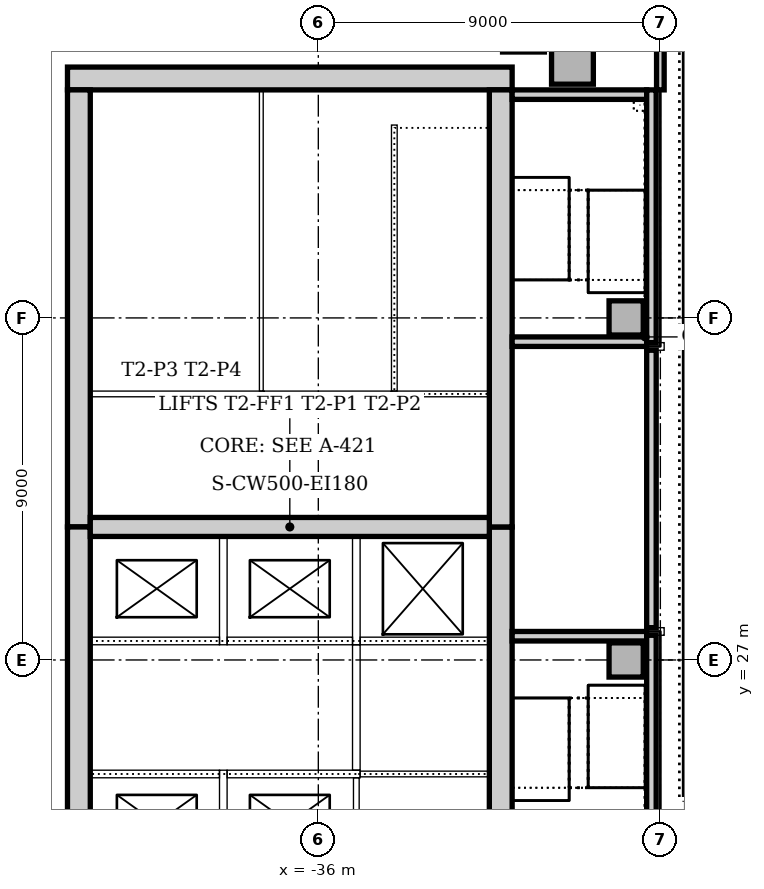
"""IFC4 building model, lengths in metres.
Left out: names, types, materials, properties, quantities, classifications, styles, units other than length and angle.
Written with IfcOpenShell. Run it as: python <this file> out.ifc"""

import sys

from ifc_helpers import new_model, si_unit, direction, frame, frame_2d, origin, origin_2d, place, context, subcontext, project, spatial, rectangle, extrude, element, fill, save


model = new_model("IFC4")
c1 = context("Model", 3, precision=1e-05, world=origin(), true_north=direction((0.0, 1.0)))
c2 = subcontext(c1, "Body", "Model", "MODEL_VIEW")
j1 = project(units=[si_unit("LENGTHUNIT", "METRE"), si_unit("PLANEANGLEUNIT", "RADIAN")], contexts=[c1])
p1 = place(None, origin())
s1 = spatial("IfcSite", under=j1, at=p1, CompositionType="ELEMENT")
p2 = place(p1, origin())
s2 = spatial("IfcBuilding", under=s1, at=p2, CompositionType="ELEMENT")
p3 = place(p2, frame((0.0, 0.0, 21.0)))
s3 = spatial("IfcBuildingStorey", under=s2, at=p3, CompositionType="ELEMENT", Elevation=21.0)
p4 = place(p3, frame((-30.9, 42.3, 0.0), z_axis=(0.0, 0.0, 1.0), x_axis=(-1.0, 0.0, 0.0)))
e1 = element("IfcWall", 1, at=p4, inside=s3, PredefinedType="SOLIDWALL", context=c2, shape_type="SweptSolid", body=[
    extrude(rectangle(XDim=11.7, YDim=0.6, at=frame_2d((5.85, 0.0))), origin(), (0.0, 0.0, 1.0), 5.0),
])
p5 = place(p3, frame((-31.2, 21.0, 0.0), z_axis=(0.0, 0.0, 1.0), x_axis=(0.0, 1.0, 0.0)))
e2 = element("IfcWall", 2, at=p5, inside=s3, PredefinedType="SOLIDWALL", context=c2, shape_type="SweptSolid", body=[
    extrude(rectangle(XDim=9.5, YDim=0.6, at=frame_2d((4.75, 0.0))), origin(), (0.0, 0.0, 1.0), 5.0),
])
p6 = place(p5, frame((5.25, 0.0, 0.0)))
e3 = element("IfcOpeningElement", 3, at=p6, cuts=e2, PredefinedType="OPENING", context=c2, shape_type="SweptSolid", body=[
    extrude(rectangle(XDim=1.0, YDim=2.1, at=frame_2d((0.5, 1.05))), frame((0.0, 0.31, 0.0), z_axis=(0.0, -1.0, 0.0), x_axis=(1.0, 0.0, 0.0)), (0.0, 0.0, 1.0), 0.62),
])
p7 = place(p3, frame((-31.2, 30.5, 0.0), z_axis=(0.0, 0.0, 1.0), x_axis=(0.0, 1.0, 0.0)))
e4 = element("IfcWall", 4, at=p7, inside=s3, PredefinedType="SOLIDWALL", context=c2, shape_type="SweptSolid", body=[
    extrude(rectangle(XDim=11.5, YDim=0.6, at=frame_2d((5.75, 0.0))), origin(), (0.0, 0.0, 1.0), 5.0),
])
p8 = place(p7, frame((0.85, 0.0, 0.0)))
e5 = element("IfcOpeningElement", 5, at=p8, cuts=e4, PredefinedType="OPENING", context=c2, shape_type="SweptSolid", body=[
    extrude(rectangle(XDim=1.8, YDim=2.1, at=frame_2d((0.9, 1.05))), frame((0.0, 0.31, 0.0), z_axis=(0.0, -1.0, 0.0), x_axis=(1.0, 0.0, 0.0)), (0.0, 0.0, 1.0), 0.62),
])
p9 = place(p3, frame((-42.3, 42.0, 0.0), z_axis=(0.0, 0.0, 1.0), x_axis=(0.0, -1.0, 0.0)))
e6 = element("IfcWall", 6, at=p9, inside=s3, PredefinedType="SOLIDWALL", context=c2, shape_type="SweptSolid", body=[
    extrude(rectangle(XDim=11.5, YDim=0.6, at=frame_2d((5.75, 0.0))), origin(), (0.0, 0.0, 1.0), 5.0),
])
p10 = place(p9, frame((8.85, 0.0, 0.0)))
e7 = element("IfcOpeningElement", 7, at=p10, cuts=e6, PredefinedType="OPENING", context=c2, shape_type="SweptSolid", body=[
    extrude(rectangle(XDim=1.8, YDim=2.1, at=frame_2d((0.9, 1.05))), frame((0.0, 0.31, 0.0), z_axis=(0.0, -1.0, 0.0), x_axis=(1.0, 0.0, 0.0)), (0.0, 0.0, 1.0), 0.62),
])
p11 = place(p3, frame((-42.3, 30.5, 0.0), z_axis=(0.0, 0.0, 1.0), x_axis=(0.0, -1.0, 0.0)))
e8 = element("IfcWall", 8, at=p11, inside=s3, PredefinedType="SOLIDWALL", context=c2, shape_type="SweptSolid", body=[
    extrude(rectangle(XDim=9.5, YDim=0.6, at=frame_2d((4.75, 0.0))), origin(), (0.0, 0.0, 1.0), 5.0),
])
p12 = place(p11, frame((3.85, 0.0, 0.0)))
e9 = element("IfcOpeningElement", 9, at=p12, cuts=e8, PredefinedType="OPENING", context=c2, shape_type="SweptSolid", body=[
    extrude(rectangle(XDim=1.8, YDim=2.1, at=frame_2d((0.9, 1.05))), frame((0.0, 0.31, 0.0), z_axis=(0.0, -1.0, 0.0), x_axis=(1.0, 0.0, 0.0)), (0.0, 0.0, 1.0), 0.62),
])
p13 = place(p3, frame((-42.0, 30.5, 0.0), z_axis=(0.0, 0.0, 1.0), x_axis=(1.0, 0.0, 0.0)))
e10 = element("IfcWall", 10, at=p13, inside=s3, PredefinedType="SOLIDWALL", context=c2, shape_type="SweptSolid", body=[
    extrude(rectangle(XDim=10.5, YDim=0.5, at=frame_2d((5.25, 0.0))), origin(), (0.0, 0.0, 1.0), 5.0),
])
p14 = place(p3, frame((-27.36, 27.625, 0.0), z_axis=(0.0, 0.0, 1.0), x_axis=(-1.0, 0.0, 0.0)))
e11 = element("IfcWall", 11, at=p14, inside=s3, PredefinedType="SOLIDWALL", context=c2, shape_type="SweptSolid", body=[
    extrude(rectangle(XDim=3.54, YDim=0.25, at=frame_2d((1.77, 0.0))), origin(), (0.0, 0.0, 1.0), 5.0),
])
p15 = place(p14, frame((1.69, 0.0, 0.0)))
e12 = element("IfcOpeningElement", 12, at=p15, cuts=e11, PredefinedType="OPENING", context=c2, shape_type="SweptSolid", body=[
    extrude(rectangle(XDim=1.1, YDim=2.1, at=frame_2d((0.55, 1.05))), frame((0.0, 0.135, 0.0), z_axis=(0.0, -1.0, 0.0), x_axis=(1.0, 0.0, 0.0)), (0.0, 0.0, 1.0), 0.27),
])
p16 = place(p3, frame((-30.9, 35.375, 0.0), z_axis=(0.0, 0.0, 1.0), x_axis=(1.0, 0.0, 0.0)))
e13 = element("IfcWall", 13, at=p16, inside=s3, PredefinedType="SOLIDWALL", context=c2, shape_type="SweptSolid", body=[
    extrude(rectangle(XDim=3.54, YDim=0.25, at=frame_2d((1.77, 0.0))), origin(), (0.0, 0.0, 1.0), 5.0),
])
p17 = place(p16, frame((0.75, 0.0, 0.0)))
e14 = element("IfcOpeningElement", 14, at=p17, cuts=e13, PredefinedType="OPENING", context=c2, shape_type="SweptSolid", body=[
    extrude(rectangle(XDim=1.1, YDim=2.1, at=frame_2d((0.55, 1.05))), frame((0.0, 0.135, 0.0), z_axis=(0.0, -1.0, 0.0), x_axis=(1.0, 0.0, 0.0)), (0.0, 0.0, 1.0), 0.27),
])
p18 = place(p3, frame((-27.36, 41.875, 0.0), z_axis=(0.0, 0.0, 1.0), x_axis=(-1.0, 0.0, 0.0)))
e15 = element("IfcWall", 15, at=p18, inside=s3, PredefinedType="SOLIDWALL", context=c2, shape_type="SweptSolid", body=[
    extrude(rectangle(XDim=3.54, YDim=0.25, at=frame_2d((1.77, 0.0))), origin(), (0.0, 0.0, 1.0), 5.0),
])
p19 = place(p3, frame((-27.235, 21.0, 0.0), z_axis=(0.0, 0.0, 1.0), x_axis=(0.0, 1.0, 0.0)))
e16 = element("IfcWall", 16, at=p19, inside=s3, PredefinedType="SOLIDWALL", context=c2, shape_type="SweptSolid", body=[
    extrude(rectangle(XDim=6.65, YDim=0.25, at=frame_2d((3.325, 0.0))), origin(), (0.0, 0.0, 1.0), 5.0),
])
p20 = place(p3, frame((-27.235, 27.85, 0.0), z_axis=(0.0, 0.0, 1.0), x_axis=(0.0, 1.0, 0.0)))
e17 = element("IfcWall", 17, at=p20, inside=s3, PredefinedType="SOLIDWALL", context=c2, shape_type="SweptSolid", body=[
    extrude(rectangle(XDim=7.3, YDim=0.25, at=frame_2d((3.65, 0.0))), origin(), (0.0, 0.0, 1.0), 5.0),
])
p21 = place(p3, frame((-27.235, 35.35, 0.0), z_axis=(0.0, 0.0, 1.0), x_axis=(0.0, 1.0, 0.0)))
e18 = element("IfcWall", 18, at=p21, inside=s3, PredefinedType="SOLIDWALL", context=c2, shape_type="SweptSolid", body=[
    extrude(rectangle(XDim=6.65, YDim=0.25, at=frame_2d((3.325, 0.0))), origin(), (0.0, 0.0, 1.0), 5.0),
])
for number, where, z_axis, x_axis in (
    (19, (-29.313, 42.7, 0.0), (0.0, 0.0, 1.0), (1.0, 0.0, 0.0)),
    (20, (-30.602, 43.547, 0.0), (0.0, 0.0, 1.0), (1.0, 0.0, 0.0)),
):
    element("IfcColumn", number, at=place(p3, frame(where, z_axis=z_axis, x_axis=x_axis)), inside=s3, PredefinedType="COLUMN", context=c2, shape_type="SweptSolid", body=[
        extrude(rectangle(XDim=1.1, YDim=1.1, at=origin_2d()), origin(), (0.0, 0.0, 1.0), 4.85),
    ])
for number, where, z_axis, x_axis in (
    (21, (-27.9, 27.0, 0.0), (0.0, 0.0, 1.0), (1.0, 0.0, 0.0)),
    (22, (-27.9, 36.0, 0.0), (0.0, 0.0, 1.0), (1.0, 0.0, 0.0)),
):
    element("IfcColumn", number, at=place(p3, frame(where, z_axis=z_axis, x_axis=x_axis)), inside=s3, PredefinedType="COLUMN", context=c2, shape_type="SweptSolid", body=[
        extrude(rectangle(XDim=0.9, YDim=0.9, at=origin_2d()), origin(), (0.0, 0.0, 1.0), 5.0),
    ])
p22 = place(p3, frame((-27.0, 42.0, 0.0), z_axis=(0.0, 0.0, 1.0), x_axis=(0.0, 1.0, 0.0)))
e23 = element("IfcWall", 23, at=p22, inside=s3, PredefinedType="PARTITIONING", context=c2, shape_type="SweptSolid", body=[
    extrude(rectangle(XDim=3.0, YDim=0.2, at=frame_2d((1.5, 0.0))), origin(), (0.0, 0.0, 1.0), 4.7),
])
p23 = place(p3, frame((-38.5, 21.0, 0.0), z_axis=(0.0, 0.0, 1.0), x_axis=(0.0, 1.0, 0.0)))
e24 = element("IfcWall", 24, at=p23, inside=s3, PredefinedType="SOLIDWALL", context=c2, shape_type="SweptSolid", body=[
    extrude(rectangle(XDim=3.1, YDim=0.2, at=frame_2d((1.55, 0.0))), origin(), (0.0, 0.0, 1.0), 5.0),
])
p24 = place(p3, frame((-38.6, 24.0, 0.0), z_axis=(0.0, 0.0, 1.0), x_axis=(-1.0, 0.0, 0.0)))
e25 = element("IfcWall", 25, at=p24, inside=s3, PredefinedType="SOLIDWALL", context=c2, shape_type="SweptSolid", body=[
    extrude(rectangle(XDim=3.4, YDim=0.2, at=frame_2d((1.7, 0.0))), origin(), (0.0, 0.0, 1.0), 5.0),
])
p25 = place(p24, frame((0.8, 0.0, 0.0)))
e26 = element("IfcOpeningElement", 26, at=p25, cuts=e25, PredefinedType="OPENING", context=c2, shape_type="SweptSolid", body=[
    extrude(rectangle(XDim=1.1, YDim=2.1, at=frame_2d((0.55, 1.05))), frame((0.0, 0.11, 0.0), z_axis=(0.0, -1.0, 0.0), x_axis=(1.0, 0.0, 0.0)), (0.0, 0.0, 1.0), 0.22),
])
p26 = place(p3, frame((-34.9, 24.0, 0.0), z_axis=(0.0, 0.0, 1.0), x_axis=(-1.0, 0.0, 0.0)))
e27 = element("IfcWall", 27, at=p26, inside=s3, PredefinedType="SOLIDWALL", context=c2, shape_type="SweptSolid", body=[
    extrude(rectangle(XDim=3.5, YDim=0.2, at=frame_2d((1.75, 0.0))), origin(), (0.0, 0.0, 1.0), 5.0),
])
p27 = place(p26, frame((1.3, 0.0, 0.0)))
e28 = element("IfcOpeningElement", 28, at=p27, cuts=e27, PredefinedType="OPENING", context=c2, shape_type="SweptSolid", body=[
    extrude(rectangle(XDim=1.1, YDim=2.1, at=frame_2d((0.55, 1.05))), frame((0.0, 0.11, 0.0), z_axis=(0.0, -1.0, 0.0), x_axis=(1.0, 0.0, 0.0)), (0.0, 0.0, 1.0), 0.22),
])
p28 = place(p3, frame((-38.5, 27.4, 0.0), z_axis=(0.0, 0.0, 1.0), x_axis=(0.0, 1.0, 0.0)))
e29 = element("IfcWall", 29, at=p28, inside=s3, PredefinedType="SOLIDWALL", context=c2, shape_type="SweptSolid", body=[
    extrude(rectangle(XDim=2.85, YDim=0.2, at=frame_2d((1.425, 0.0))), origin(), (0.0, 0.0, 1.0), 5.0),
])
p29 = place(p3, frame((-42.0, 27.5, 0.0), z_axis=(0.0, 0.0, 1.0), x_axis=(1.0, 0.0, 0.0)))
e30 = element("IfcWall", 30, at=p29, inside=s3, PredefinedType="SOLIDWALL", context=c2, shape_type="SweptSolid", body=[
    extrude(rectangle(XDim=3.4, YDim=0.2, at=frame_2d((1.7, 0.0))), origin(), (0.0, 0.0, 1.0), 5.0),
])
p30 = place(p29, frame((1.5, 0.0, 0.0)))
e31 = element("IfcOpeningElement", 31, at=p30, cuts=e30, PredefinedType="OPENING", context=c2, shape_type="SweptSolid", body=[
    extrude(rectangle(XDim=1.1, YDim=2.1, at=frame_2d((0.55, 1.05))), frame((0.0, 0.11, 0.0), z_axis=(0.0, -1.0, 0.0), x_axis=(1.0, 0.0, 0.0)), (0.0, 0.0, 1.0), 0.22),
])
p31 = place(p3, frame((-35.0, 27.4, 0.0), z_axis=(0.0, 0.0, 1.0), x_axis=(0.0, 1.0, 0.0)))
e32 = element("IfcWall", 32, at=p31, inside=s3, PredefinedType="SOLIDWALL", context=c2, shape_type="SweptSolid", body=[
    extrude(rectangle(XDim=2.85, YDim=0.2, at=frame_2d((1.425, 0.0))), origin(), (0.0, 0.0, 1.0), 5.0),
])
p32 = place(p3, frame((-38.4, 27.5, 0.0), z_axis=(0.0, 0.0, 1.0), x_axis=(1.0, 0.0, 0.0)))
e33 = element("IfcWall", 33, at=p32, inside=s3, PredefinedType="SOLIDWALL", context=c2, shape_type="SweptSolid", body=[
    extrude(rectangle(XDim=3.3, YDim=0.2, at=frame_2d((1.65, 0.0))), origin(), (0.0, 0.0, 1.0), 5.0),
])
p33 = place(p32, frame((1.1, 0.0, 0.0)))
e34 = element("IfcOpeningElement", 34, at=p33, cuts=e33, PredefinedType="OPENING", context=c2, shape_type="SweptSolid", body=[
    extrude(rectangle(XDim=1.1, YDim=2.1, at=frame_2d((0.55, 1.05))), frame((0.0, 0.11, 0.0), z_axis=(0.0, -1.0, 0.0), x_axis=(1.0, 0.0, 0.0)), (0.0, 0.0, 1.0), 0.22),
])
p34 = place(p3, frame((-34.9, 27.5, 0.0), z_axis=(0.0, 0.0, 1.0), x_axis=(1.0, 0.0, 0.0)))
e35 = element("IfcWall", 35, at=p34, inside=s3, PredefinedType="SOLIDWALL", context=c2, shape_type="SweptSolid", body=[
    extrude(rectangle(XDim=3.4, YDim=0.2, at=frame_2d((1.7, 0.0))), origin(), (0.0, 0.0, 1.0), 5.0),
])
p35 = place(p34, frame((1.1, 0.0, 0.0)))
e36 = element("IfcOpeningElement", 36, at=p35, cuts=e35, PredefinedType="OPENING", context=c2, shape_type="SweptSolid", body=[
    extrude(rectangle(XDim=1.1, YDim=2.1, at=frame_2d((0.55, 1.05))), frame((0.0, 0.11, 0.0), z_axis=(0.0, -1.0, 0.0), x_axis=(1.0, 0.0, 0.0)), (0.0, 0.0, 1.0), 0.22),
])
p36 = place(p3, frame((-35.0, 24.1, 0.0), z_axis=(0.0, 0.0, 1.0), x_axis=(0.0, 1.0, 0.0)))
e37 = element("IfcWall", 37, at=p36, inside=s3, PredefinedType="SOLIDWALL", context=c2, shape_type="SweptSolid", body=[
    extrude(rectangle(XDim=3.3, YDim=0.2, at=frame_2d((1.65, 0.0))), origin(), (0.0, 0.0, 1.0), 5.0),
])
p37 = place(p36, frame((1.15, 0.0, 0.0)))
e38 = element("IfcOpeningElement", 38, at=p37, cuts=e37, PredefinedType="OPENING", context=c2, shape_type="SweptSolid", body=[
    extrude(rectangle(XDim=1.0, YDim=2.1, at=frame_2d((0.5, 1.05))), frame((0.0, 0.11, 0.0), z_axis=(0.0, -1.0, 0.0), x_axis=(1.0, 0.0, 0.0)), (0.0, 0.0, 1.0), 0.22),
])
for number, where, z_axis, x_axis in (
    (39, (-27.36, 27.75, 0.0), (0.0, 0.0, 1.0), (1.0, 0.0, 0.0)),
    (40, (-26.9, 35.25, 0.0), (0.0, 0.0, 1.0), (-1.0, 0.0, 0.0)),
):
    element("IfcWall", number, at=place(p3, frame(where, z_axis=z_axis, x_axis=x_axis)), inside=s3, PredefinedType="SOLIDWALL", context=c2, shape_type="SweptSolid", body=[
        extrude(rectangle(XDim=0.46, YDim=0.2, at=frame_2d((0.23, 0.0))), origin(), (0.0, 0.0, 1.0), 5.0),
    ])
p38 = place(p3, frame((-35.0, 21.0, 0.0), z_axis=(0.0, 0.0, 1.0), x_axis=(0.0, 1.0, 0.0)))
e41 = element("IfcWall", 41, at=p38, inside=s3, PredefinedType="SOLIDWALL", context=c2, shape_type="SweptSolid", body=[
    extrude(rectangle(XDim=2.9, YDim=0.15, at=frame_2d((1.45, 0.0))), origin(), (0.0, 0.0, 1.0), 5.0),
])
p39 = place(p3, frame((-31.5, 24.0, 0.0), z_axis=(0.0, 0.0, 1.0), x_axis=(-1.0, 0.0, 0.0)))
e42 = element("IfcWall", 42, at=p39, inside=s3, PredefinedType="SOLIDWALL", context=c2, shape_type="SweptSolid", body=[
    extrude(rectangle(XDim=3.4, YDim=0.15, at=frame_2d((1.7, 0.0))), origin(), (0.0, 0.0, 1.0), 5.0),
])
p40 = place(p3, frame((-34.075, 34.0, 0.0), z_axis=(0.0, 0.0, 1.0), x_axis=(1.0, 0.0, 0.0)))
e43 = element("IfcWall", 43, at=p40, inside=s3, PredefinedType="SOLIDWALL", context=c2, shape_type="SweptSolid", body=[
    extrude(rectangle(XDim=2.575, YDim=0.15, at=frame_2d((1.288, 0.0))), origin(), (0.0, 0.0, 1.0), 5.0),
])
p41 = place(p3, frame((-34.0, 41.075, 0.0), z_axis=(0.0, 0.0, 1.0), x_axis=(0.0, -1.0, 0.0)))
e44 = element("IfcWall", 44, at=p41, inside=s3, PredefinedType="SOLIDWALL", context=c2, shape_type="SweptSolid", body=[
    extrude(rectangle(XDim=7.0, YDim=0.15, at=frame_2d((3.5, 0.0))), origin(), (0.0, 0.0, 1.0), 5.0),
])
p42 = place(p3, frame((-37.425, 34.0, 0.0), z_axis=(0.0, 0.0, 1.0), x_axis=(-1.0, 0.0, 0.0)))
e45 = element("IfcWall", 45, at=p42, inside=s3, PredefinedType="PARTITIONING", context=c2, shape_type="SweptSolid", body=[
    extrude(rectangle(XDim=4.575, YDim=0.15, at=frame_2d((2.288, 0.0))), origin(), (0.0, 0.0, 1.0), 4.85),
])
p43 = place(p42, frame((1.925, 0.0, 0.0)))
e46 = element("IfcOpeningElement", 46, at=p43, cuts=e45, PredefinedType="OPENING", context=c2, shape_type="SweptSolid", body=[
    extrude(rectangle(XDim=0.8, YDim=2.1, at=frame_2d((0.4, 1.05))), frame((0.0, 0.085, 0.0), z_axis=(0.0, -1.0, 0.0), x_axis=(1.0, 0.0, 0.0)), (0.0, 0.0, 1.0), 0.17),
])
p44 = place(p3, frame((-34.075, 34.0, 0.0), z_axis=(0.0, 0.0, 1.0), x_axis=(-1.0, 0.0, 0.0)))
e47 = element("IfcWall", 47, at=p44, inside=s3, PredefinedType="PARTITIONING", context=c2, shape_type="SweptSolid", body=[
    extrude(rectangle(XDim=3.35, YDim=0.15, at=frame_2d((1.675, 0.0))), origin(), (0.0, 0.0, 1.0), 4.85),
])
p45 = place(p44, frame((1.275, 0.0, 0.0)))
e48 = element("IfcOpeningElement", 48, at=p45, cuts=e47, PredefinedType="OPENING", context=c2, shape_type="SweptSolid", body=[
    extrude(rectangle(XDim=0.8, YDim=2.1, at=frame_2d((0.4, 1.05))), frame((0.0, 0.085, 0.0), z_axis=(0.0, -1.0, 0.0), x_axis=(1.0, 0.0, 0.0)), (0.0, 0.0, 1.0), 0.17),
])
p46 = place(p3, frame((-37.5, 34.075, 0.0), z_axis=(0.0, 0.0, 1.0), x_axis=(0.0, 1.0, 0.0)))
e49 = element("IfcWall", 49, at=p46, inside=s3, PredefinedType="PARTITIONING", context=c2, shape_type="SweptSolid", body=[
    extrude(rectangle(XDim=7.925, YDim=0.1, at=frame_2d((3.962, 0.0))), origin(), (0.0, 0.0, 1.0), 4.85),
])
p47 = place(p25, origin())
e50 = element("IfcDoor", 50, at=p47, inside=s3, OperationType="SLIDING_TO_LEFT", PredefinedType="DOOR", context=c2, shape_type="SweptSolid", body=[
    extrude(rectangle(XDim=1.1, YDim=2.1, at=frame_2d((0.55, 1.05))), frame((0.0, 0.025, 0.0), z_axis=(0.0, -1.0, 0.0), x_axis=(1.0, 0.0, 0.0)), (0.0, 0.0, 1.0), 0.05),
])
fill(e26, e50)
p48 = place(p27, origin())
e51 = element("IfcDoor", 51, at=p48, inside=s3, OperationType="SLIDING_TO_LEFT", PredefinedType="DOOR", context=c2, shape_type="SweptSolid", body=[
    extrude(rectangle(XDim=1.1, YDim=2.1, at=frame_2d((0.55, 1.05))), frame((0.0, 0.025, 0.0), z_axis=(0.0, -1.0, 0.0), x_axis=(1.0, 0.0, 0.0)), (0.0, 0.0, 1.0), 0.05),
])
fill(e28, e51)
p49 = place(p30, origin())
e52 = element("IfcDoor", 52, at=p49, inside=s3, OperationType="SLIDING_TO_LEFT", PredefinedType="DOOR", context=c2, shape_type="SweptSolid", body=[
    extrude(rectangle(XDim=1.1, YDim=2.1, at=frame_2d((0.55, 1.05))), frame((0.0, 0.025, 0.0), z_axis=(0.0, -1.0, 0.0), x_axis=(1.0, 0.0, 0.0)), (0.0, 0.0, 1.0), 0.05),
])
fill(e31, e52)
p50 = place(p33, origin())
e53 = element("IfcDoor", 53, at=p50, inside=s3, OperationType="SLIDING_TO_LEFT", PredefinedType="DOOR", context=c2, shape_type="SweptSolid", body=[
    extrude(rectangle(XDim=1.1, YDim=2.1, at=frame_2d((0.55, 1.05))), frame((0.0, 0.025, 0.0), z_axis=(0.0, -1.0, 0.0), x_axis=(1.0, 0.0, 0.0)), (0.0, 0.0, 1.0), 0.05),
])
fill(e34, e53)
p51 = place(p35, origin())
e54 = element("IfcDoor", 54, at=p51, inside=s3, OperationType="SLIDING_TO_LEFT", PredefinedType="DOOR", context=c2, shape_type="SweptSolid", body=[
    extrude(rectangle(XDim=1.1, YDim=2.1, at=frame_2d((0.55, 1.05))), frame((0.0, 0.025, 0.0), z_axis=(0.0, -1.0, 0.0), x_axis=(1.0, 0.0, 0.0)), (0.0, 0.0, 1.0), 0.05),
])
fill(e36, e54)
p52 = place(p37, origin())
e55 = element("IfcDoor", 55, at=p52, inside=s3, OperationType="SINGLE_SWING_LEFT", PredefinedType="DOOR", context=c2, shape_type="SweptSolid", body=[
    extrude(rectangle(XDim=1.0, YDim=2.1, at=frame_2d((0.5, 1.05))), frame((0.0, 0.025, 0.0), z_axis=(0.0, -1.0, 0.0), x_axis=(1.0, 0.0, 0.0)), (0.0, 0.0, 1.0), 0.05),
])
fill(e38, e55)
p53 = place(p6, frame((1.0, 0.0, 0.0), z_axis=(0.0, 0.0, 1.0), x_axis=(-1.0, 0.0, 0.0)))
e56 = element("IfcDoor", 56, at=p53, inside=s3, OperationType="SINGLE_SWING_LEFT", PredefinedType="DOOR", context=c2, shape_type="SweptSolid", body=[
    extrude(rectangle(XDim=1.0, YDim=2.1, at=frame_2d((0.5, 1.05))), frame((0.0, 0.025, 0.0), z_axis=(0.0, -1.0, 0.0), x_axis=(1.0, 0.0, 0.0)), (0.0, 0.0, 1.0), 0.05),
])
fill(e3, e56)
p54 = place(p15, origin())
e57 = element("IfcDoor", 57, at=p54, inside=s3, OperationType="SINGLE_SWING_RIGHT", PredefinedType="DOOR", context=c2, shape_type="SweptSolid", body=[
    extrude(rectangle(XDim=1.1, YDim=2.1, at=frame_2d((0.55, 1.05))), frame((0.0, 0.025, 0.0), z_axis=(0.0, -1.0, 0.0), x_axis=(1.0, 0.0, 0.0)), (0.0, 0.0, 1.0), 0.05),
])
fill(e12, e57)
p55 = place(p17, origin())
e58 = element("IfcDoor", 58, at=p55, inside=s3, OperationType="SINGLE_SWING_RIGHT", PredefinedType="DOOR", context=c2, shape_type="SweptSolid", body=[
    extrude(rectangle(XDim=1.1, YDim=2.1, at=frame_2d((0.55, 1.05))), frame((0.0, 0.025, 0.0), z_axis=(0.0, -1.0, 0.0), x_axis=(1.0, 0.0, 0.0)), (0.0, 0.0, 1.0), 0.05),
])
fill(e14, e58)
p56 = place(p8, origin())
e59 = element("IfcDoor", 59, at=p56, inside=s3, OperationType="DOUBLE_DOOR_SINGLE_SWING", PredefinedType="DOOR", context=c2, shape_type="SweptSolid", body=[
    extrude(rectangle(XDim=1.8, YDim=2.1, at=frame_2d((0.9, 1.05))), frame((0.0, 0.025, 0.0), z_axis=(0.0, -1.0, 0.0), x_axis=(1.0, 0.0, 0.0)), (0.0, 0.0, 1.0), 0.05),
])
fill(e5, e59)
p57 = place(p12, origin())
e60 = element("IfcDoor", 60, at=p57, inside=s3, OperationType="DOUBLE_DOOR_SINGLE_SWING", PredefinedType="DOOR", context=c2, shape_type="SweptSolid", body=[
    extrude(rectangle(XDim=1.8, YDim=2.1, at=frame_2d((0.9, 1.05))), frame((0.0, 0.025, 0.0), z_axis=(0.0, -1.0, 0.0), x_axis=(1.0, 0.0, 0.0)), (0.0, 0.0, 1.0), 0.05),
])
fill(e9, e60)
p58 = place(p10, frame((1.8, 0.0, 0.0), z_axis=(0.0, 0.0, 1.0), x_axis=(-1.0, 0.0, 0.0)))
e61 = element("IfcDoor", 61, at=p58, inside=s3, OperationType="DOUBLE_DOOR_SINGLE_SWING", PredefinedType="DOOR", context=c2, shape_type="SweptSolid", body=[
    extrude(rectangle(XDim=1.8, YDim=2.1, at=frame_2d((0.9, 1.05))), frame((0.0, 0.025, 0.0), z_axis=(0.0, -1.0, 0.0), x_axis=(1.0, 0.0, 0.0)), (0.0, 0.0, 1.0), 0.05),
])
fill(e7, e61)
p59 = place(p43, frame((0.8, 0.0, 0.0), z_axis=(0.0, 0.0, 1.0), x_axis=(-1.0, 0.0, 0.0)))
e62 = element("IfcDoor", 62, at=p59, inside=s3, OperationType="SINGLE_SWING_RIGHT", PredefinedType="DOOR", context=c2, shape_type="SweptSolid", body=[
    extrude(rectangle(XDim=0.8, YDim=2.1, at=frame_2d((0.4, 1.05))), frame((0.0, 0.025, 0.0), z_axis=(0.0, -1.0, 0.0), x_axis=(1.0, 0.0, 0.0)), (0.0, 0.0, 1.0), 0.05),
])
fill(e46, e62)
p60 = place(p45, frame((0.8, 0.0, 0.0), z_axis=(0.0, 0.0, 1.0), x_axis=(-1.0, 0.0, 0.0)))
e63 = element("IfcDoor", 63, at=p60, inside=s3, OperationType="SINGLE_SWING_RIGHT", PredefinedType="DOOR", context=c2, shape_type="SweptSolid", body=[
    extrude(rectangle(XDim=0.8, YDim=2.1, at=frame_2d((0.4, 1.05))), frame((0.0, 0.025, 0.0), z_axis=(0.0, -1.0, 0.0), x_axis=(1.0, 0.0, 0.0)), (0.0, 0.0, 1.0), 0.05),
])
fill(e48, e63)
save(model, sys.argv[1])
